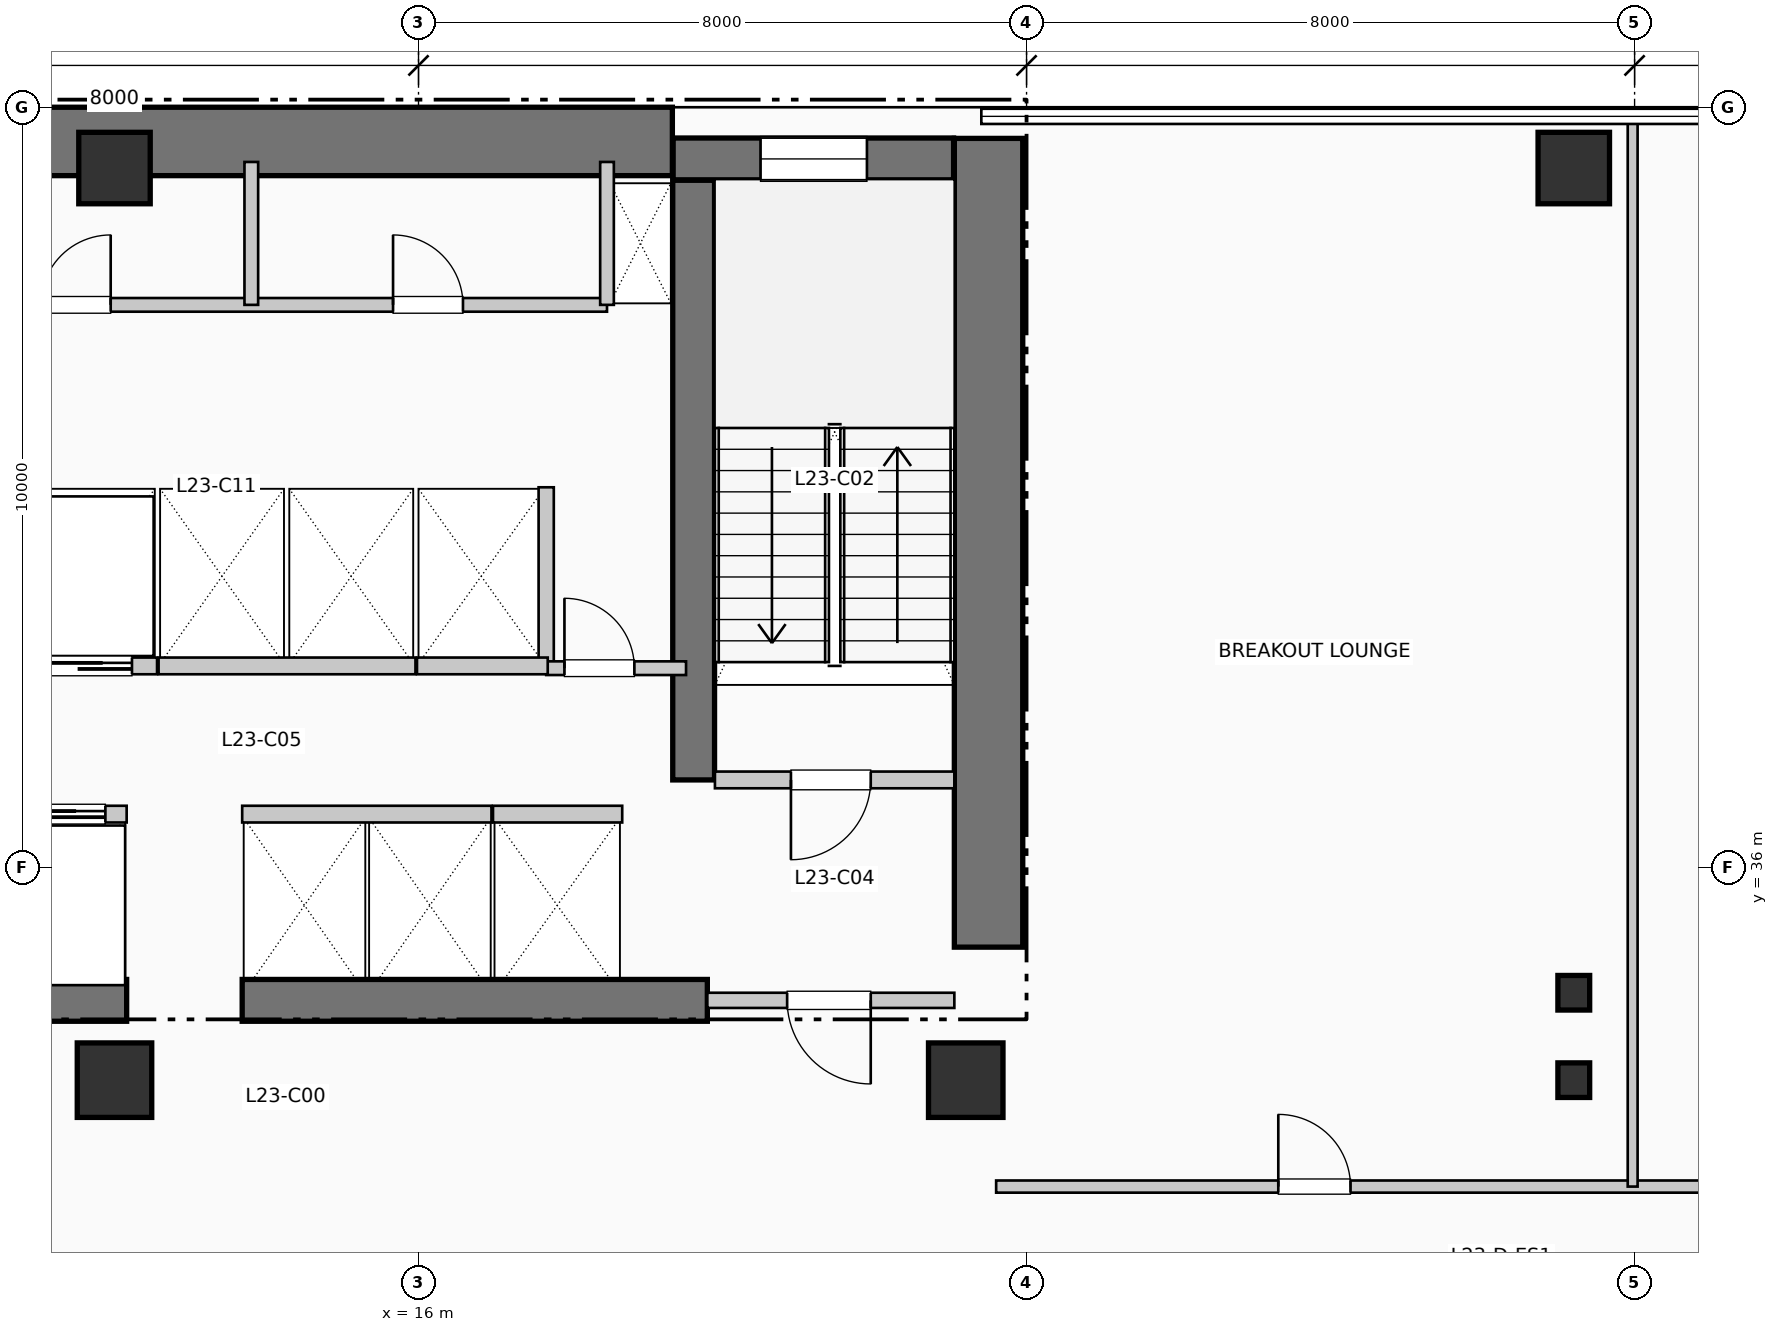
"""IFC4 building model, lengths in metres.
Left out: names, types, materials, properties, quantities, classifications, styles, units other than length and angle.
Written with IfcOpenShell. Run it as: python <this file> out.ifc"""

import sys

from ifc_helpers import new_model, si_unit, direction, frame, frame_2d, origin, origin_2d, place, context, subcontext, project, spatial, rectangle, i_section, extrude, element, fill, save


model = new_model("IFC4")
c1 = context("Model", 3, precision=1e-05, world=origin(), true_north=direction((0.0, 1.0)))
c2 = subcontext(c1, "Body", "Model", "MODEL_VIEW")
j1 = project(units=[si_unit("LENGTHUNIT", "METRE"), si_unit("PLANEANGLEUNIT", "RADIAN")], contexts=[c1])
p1 = place(None, origin())
s1 = spatial("IfcSite", under=j1, at=p1, CompositionType="ELEMENT")
p2 = place(p1, origin())
s2 = spatial("IfcBuilding", under=s1, at=p2, CompositionType="ELEMENT")
p3 = place(p2, frame((0.0, 0.0, 98.67)))
s3 = spatial("IfcBuildingStorey", under=s2, at=p3, CompositionType="ELEMENT", Elevation=98.67)
p4 = place(p3, frame((5.36, 45.55, 0.0), z_axis=(0.0, 0.0, 1.0), x_axis=(1.0, 0.0, 0.0)))
e1 = element("IfcWall", 1, at=p4, inside=s3, PredefinedType="SHEAR", context=c2, shape_type="SweptSolid", body=[
    extrude(rectangle(XDim=13.98, YDim=0.9, at=frame_2d((6.99, 0.0))), origin(), (0.0, 0.0, 1.0), 3.96),
])
p5 = place(p3, frame((23.5, 34.95, 0.0), z_axis=(0.0, 0.0, 1.0), x_axis=(0.0, 1.0, 0.0)))
e2 = element("IfcWall", 2, at=p5, inside=s3, PredefinedType="SHEAR", context=c2, shape_type="SweptSolid", body=[
    extrude(rectangle(XDim=10.64, YDim=0.9, at=frame_2d((5.32, 0.0))), origin(), (0.0, 0.0, 1.0), 3.96),
])
p6 = place(p3, frame((1.45, 34.25, 0.0), z_axis=(0.0, 0.0, 1.0), x_axis=(1.0, 0.0, 0.0)))
e3 = element("IfcWall", 3, at=p6, inside=s3, PredefinedType="SHEAR", context=c2, shape_type="SweptSolid", body=[
    extrude(rectangle(XDim=10.71, YDim=0.55, at=frame_2d((5.355, 0.0))), origin(), (0.0, 0.0, 1.0), 3.96),
])
p7 = place(p6, frame((7.25, 0.0, 0.0), z_axis=(0.0, 0.0, 1.0), x_axis=(-1.0, 0.0, 0.0)))
e4 = element("IfcOpeningElement", 4, at=p7, cuts=e3, PredefinedType="OPENING", context=c2, shape_type="SweptSolid", body=[
    extrude(rectangle(XDim=1.1, YDim=2.15, at=frame_2d((0.55, 1.075))), frame((0.0, 0.285, 0.0), z_axis=(0.0, -1.0, 0.0), x_axis=(1.0, 0.0, 0.0)), (0.0, 0.0, 1.0), 0.57),
])
p8 = place(p3, frame((13.68, 34.25, 0.0), z_axis=(0.0, 0.0, 1.0), x_axis=(1.0, 0.0, 0.0)))
e5 = element("IfcWall", 5, at=p8, inside=s3, PredefinedType="SHEAR", context=c2, shape_type="SweptSolid", body=[
    extrude(rectangle(XDim=6.12, YDim=0.55, at=frame_2d((3.06, 0.0))), origin(), (0.0, 0.0, 1.0), 3.96),
])
p9 = place(p3, frame((19.62, 37.15, 0.0), z_axis=(0.0, 0.0, 1.0), x_axis=(0.0, 1.0, 0.0)))
e6 = element("IfcWall", 6, at=p9, inside=s3, PredefinedType="SHEAR", context=c2, shape_type="SweptSolid", body=[
    extrude(rectangle(XDim=7.89, YDim=0.55, at=frame_2d((3.945, 0.0))), origin(), (0.0, 0.0, 1.0), 3.96),
])
p10 = place(p3, frame((19.35, 45.32, 0.0), z_axis=(0.0, 0.0, 1.0), x_axis=(1.0, 0.0, 0.0)))
e7 = element("IfcWall", 7, at=p10, inside=s3, PredefinedType="SHEAR", context=c2, shape_type="SweptSolid", body=[
    extrude(rectangle(XDim=3.69, YDim=0.55, at=frame_2d((1.845, 0.0))), origin(), (0.0, 0.0, 1.0), 3.96),
])
p11 = place(p10, frame((1.15, 0.0, 1.05)))
e8 = element("IfcOpeningElement", 8, at=p11, cuts=e7, PredefinedType="OPENING", context=c2, shape_type="SweptSolid", body=[
    extrude(rectangle(XDim=1.4, YDim=1.8, at=frame_2d((0.7, 0.9))), frame((0.0, 0.285, 0.0), z_axis=(0.0, -1.0, 0.0), x_axis=(1.0, 0.0, 0.0)), (0.0, 0.0, 1.0), 0.57),
])
p12 = place(p3, frame((12.0, 33.2, 0.0), z_axis=(0.0, 0.0, 1.0), x_axis=(1.0, 0.0, 0.0)))
e9 = element("IfcColumn", 9, at=p12, inside=s3, PredefinedType="COLUMN", context=c2, shape_type="SweptSolid", body=[
    extrude(rectangle(XDim=0.98, YDim=0.98, at=origin_2d()), origin(), (0.0, 0.0, 1.0), 3.96),
])
p13 = place(p3, frame((12.0, 45.2, 0.0), z_axis=(0.0, 0.0, 1.0), x_axis=(1.0, 0.0, 0.0)))
e10 = element("IfcColumn", 10, at=p13, inside=s3, PredefinedType="COLUMN", context=c2, shape_type="SweptSolid", body=[
    extrude(rectangle(XDim=0.94, YDim=0.94, at=origin_2d()), origin(), (0.0, 0.0, 1.0), 3.96),
])
p14 = place(p3, frame((23.2, 33.2, 0.0), z_axis=(0.0, 0.0, 1.0), x_axis=(1.0, 0.0, 0.0)))
e11 = element("IfcColumn", 11, at=p14, inside=s3, PredefinedType="COLUMN", context=c2, shape_type="SweptSolid", body=[
    extrude(rectangle(XDim=0.98, YDim=0.98, at=origin_2d()), origin(), (0.0, 0.0, 1.0), 3.96),
])
for number, where, z_axis, x_axis in (
    (12, (31.2, 33.2, 0.0), (0.0, 0.0, 1.0), (1.0, 0.0, 0.0)),
    (13, (31.2, 34.35, 0.0), (0.0, 0.0, 1.0), (1.0, 0.0, 0.0)),
):
    element("IfcColumn", number, at=place(p3, frame(where, z_axis=z_axis, x_axis=x_axis)), inside=s3, PredefinedType="COLUMN", context=c2, shape_type="SweptSolid", body=[
        extrude(i_section(OverallWidth=0.418, OverallDepth=0.455, WebThickness=0.032, FlangeThickness=0.051, at=origin_2d()), origin(), (0.0, 0.0, 1.0), 3.96),
    ])
p15 = place(p3, frame((31.2, 45.2, 0.0), z_axis=(0.0, 0.0, 1.0), x_axis=(1.0, 0.0, 0.0)))
e14 = element("IfcColumn", 14, at=p15, inside=s3, PredefinedType="COLUMN", context=c2, shape_type="SweptSolid", body=[
    extrude(rectangle(XDim=0.94, YDim=0.94, at=origin_2d()), origin(), (0.0, 0.0, 1.0), 3.96),
])
p16 = place(p3, frame((19.9, 37.15, 0.0), z_axis=(0.0, 0.0, 1.0), x_axis=(1.0, 0.0, 0.0)))
e15 = element("IfcWall", 15, at=p16, inside=s3, PredefinedType="PARTITIONING", context=c2, shape_type="SweptSolid", body=[
    extrude(rectangle(XDim=3.15, YDim=0.22, at=frame_2d((1.575, 0.0))), origin(), (0.0, 0.0, 1.0), 3.71),
])
p17 = place(p16, frame((2.05, 0.0, 0.0), z_axis=(0.0, 0.0, 1.0), x_axis=(-1.0, 0.0, 0.0)))
e16 = element("IfcOpeningElement", 16, at=p17, cuts=e15, PredefinedType="OPENING", context=c2, shape_type="SweptSolid", body=[
    extrude(rectangle(XDim=1.05, YDim=2.15, at=frame_2d((0.525, 1.075))), frame((0.0, 0.12, 0.0), z_axis=(0.0, -1.0, 0.0), x_axis=(1.0, 0.0, 0.0)), (0.0, 0.0, 1.0), 0.24),
])
p18 = place(p3, frame((19.8, 34.25, 0.0), z_axis=(0.0, 0.0, 1.0), x_axis=(1.0, 0.0, 0.0)))
e17 = element("IfcWall", 17, at=p18, inside=s3, PredefinedType="PARTITIONING", context=c2, shape_type="SweptSolid", body=[
    extrude(rectangle(XDim=3.25, YDim=0.2, at=frame_2d((1.625, 0.0))), origin(), (0.0, 0.0, 1.0), 3.71),
])
p19 = place(p18, frame((2.15, 0.0, 0.0), z_axis=(0.0, 0.0, 1.0), x_axis=(-1.0, 0.0, 0.0)))
e18 = element("IfcOpeningElement", 18, at=p19, cuts=e17, PredefinedType="OPENING", context=c2, shape_type="SweptSolid", body=[
    extrude(rectangle(XDim=1.1, YDim=2.15, at=frame_2d((0.55, 1.075))), frame((0.0, 0.11, 0.0), z_axis=(0.0, -1.0, 0.0), x_axis=(1.0, 0.0, 0.0)), (0.0, 0.0, 1.0), 0.22),
])
p20 = place(p3, frame((17.68, 38.65, 0.0), z_axis=(0.0, 0.0, 1.0), x_axis=(0.0, 1.0, 0.0)))
e19 = element("IfcWall", 19, at=p20, inside=s3, PredefinedType="PARTITIONING", context=c2, shape_type="SweptSolid", body=[
    extrude(rectangle(XDim=2.35, YDim=0.2, at=frame_2d((1.175, 0.0))), origin(), (0.0, 0.0, 1.0), 3.71),
])
p21 = place(p3, frame((17.68, 38.62, 0.0), z_axis=(0.0, 0.0, 1.0), x_axis=(1.0, 0.0, 0.0)))
e20 = element("IfcWall", 20, at=p21, inside=s3, PredefinedType="PARTITIONING", context=c2, shape_type="SweptSolid", body=[
    extrude(rectangle(XDim=1.84, YDim=0.18, at=frame_2d((0.92, 0.0))), origin(), (0.0, 0.0, 1.0), 3.71),
])
p22 = place(p21, frame((0.24, 0.0, 0.0)))
e21 = element("IfcOpeningElement", 21, at=p22, cuts=e20, PredefinedType="OPENING", context=c2, shape_type="SweptSolid", body=[
    extrude(rectangle(XDim=0.92, YDim=2.1, at=frame_2d((0.46, 1.05))), frame((0.0, 0.1, 0.0), z_axis=(0.0, -1.0, 0.0), x_axis=(1.0, 0.0, 0.0)), (0.0, 0.0, 1.0), 0.2),
])
p23 = place(p3, frame((8.9, 36.7, 0.0), z_axis=(0.0, 0.0, 1.0), x_axis=(1.0, 0.0, 0.0)))
e22 = element("IfcWall", 22, at=p23, inside=s3, PredefinedType="PARTITIONING", context=c2, shape_type="SweptSolid", body=[
    extrude(rectangle(XDim=3.26, YDim=0.22, at=frame_2d((1.63, 0.0))), origin(), (0.0, 0.0, 1.0), 3.71),
])
p24 = place(p23, frame((0.26, 0.0, 0.0)))
e23 = element("IfcOpeningElement", 23, at=p24, cuts=e22, PredefinedType="OPENING", context=c2, shape_type="SweptSolid", body=[
    extrude(rectangle(XDim=1.1, YDim=2.2, at=frame_2d((0.55, 1.1))), frame((0.0, 0.12, 0.0), z_axis=(0.0, -1.0, 0.0), x_axis=(1.0, 0.0, 0.0)), (0.0, 0.0, 1.0), 0.24),
])
p25 = place(p23, frame((1.88, 0.0, 0.0)))
e24 = element("IfcOpeningElement", 24, at=p25, cuts=e22, PredefinedType="OPENING", context=c2, shape_type="SweptSolid", body=[
    extrude(rectangle(XDim=1.1, YDim=2.2, at=frame_2d((0.55, 1.1))), frame((0.0, 0.12, 0.0), z_axis=(0.0, -1.0, 0.0), x_axis=(1.0, 0.0, 0.0)), (0.0, 0.0, 1.0), 0.24),
])
p26 = place(p3, frame((9.18, 38.65, 0.0), z_axis=(0.0, 0.0, 1.0), x_axis=(1.0, 0.0, 0.0)))
e25 = element("IfcWall", 25, at=p26, inside=s3, PredefinedType="PARTITIONING", context=c2, shape_type="SweptSolid", body=[
    extrude(rectangle(XDim=3.38, YDim=0.22, at=frame_2d((1.69, 0.0))), origin(), (0.0, 0.0, 1.0), 3.71),
])
p27 = place(p26, frame((0.3, 0.0, 0.0)))
e26 = element("IfcOpeningElement", 26, at=p27, cuts=e25, PredefinedType="OPENING", context=c2, shape_type="SweptSolid", body=[
    extrude(rectangle(XDim=1.1, YDim=2.2, at=frame_2d((0.55, 1.1))), frame((0.0, 0.12, 0.0), z_axis=(0.0, -1.0, 0.0), x_axis=(1.0, 0.0, 0.0)), (0.0, 0.0, 1.0), 0.24),
])
p28 = place(p26, frame((1.95, 0.0, 0.0)))
e27 = element("IfcOpeningElement", 27, at=p28, cuts=e25, PredefinedType="OPENING", context=c2, shape_type="SweptSolid", body=[
    extrude(rectangle(XDim=1.1, YDim=2.2, at=frame_2d((0.55, 1.1))), frame((0.0, 0.12, 0.0), z_axis=(0.0, -1.0, 0.0), x_axis=(1.0, 0.0, 0.0)), (0.0, 0.0, 1.0), 0.24),
])
p29 = place(p3, frame((13.68, 36.7, 0.0), z_axis=(0.0, 0.0, 1.0), x_axis=(1.0, 0.0, 0.0)))
e28 = element("IfcWall", 28, at=p29, inside=s3, PredefinedType="PARTITIONING", context=c2, shape_type="SweptSolid", body=[
    extrude(rectangle(XDim=3.28, YDim=0.22, at=frame_2d((1.64, 0.0))), origin(), (0.0, 0.0, 1.0), 3.71),
])
p30 = place(p3, frame((12.58, 38.65, 0.0), z_axis=(0.0, 0.0, 1.0), x_axis=(1.0, 0.0, 0.0)))
e29 = element("IfcWall", 29, at=p30, inside=s3, PredefinedType="PARTITIONING", context=c2, shape_type="SweptSolid", body=[
    extrude(rectangle(XDim=3.38, YDim=0.22, at=frame_2d((1.69, 0.0))), origin(), (0.0, 0.0, 1.0), 3.71),
])
p31 = place(p3, frame((16.98, 36.7, 0.0), z_axis=(0.0, 0.0, 1.0), x_axis=(1.0, 0.0, 0.0)))
e30 = element("IfcWall", 30, at=p31, inside=s3, PredefinedType="PARTITIONING", context=c2, shape_type="SweptSolid", body=[
    extrude(rectangle(XDim=1.7, YDim=0.22, at=frame_2d((0.85, 0.0))), origin(), (0.0, 0.0, 1.0), 3.71),
])
p32 = place(p3, frame((15.98, 38.65, 0.0), z_axis=(0.0, 0.0, 1.0), x_axis=(1.0, 0.0, 0.0)))
e31 = element("IfcWall", 31, at=p32, inside=s3, PredefinedType="PARTITIONING", context=c2, shape_type="SweptSolid", body=[
    extrude(rectangle(XDim=1.72, YDim=0.22, at=frame_2d((0.86, 0.0))), origin(), (0.0, 0.0, 1.0), 3.71),
])
p33 = place(p3, frame((9.15, 43.4, 0.0), z_axis=(0.0, 0.0, 1.0), x_axis=(1.0, 0.0, 0.0)))
e32 = element("IfcWall", 32, at=p33, inside=s3, PredefinedType="PLUMBINGWALL", context=c2, shape_type="SweptSolid", body=[
    extrude(rectangle(XDim=9.33, YDim=0.18, at=frame_2d((4.665, 0.0))), origin(), (0.0, 0.0, 1.0), 3.71),
])
p34 = place(p33, frame((1.88, 0.0, 0.0)))
e33 = element("IfcOpeningElement", 33, at=p34, cuts=e32, PredefinedType="OPENING", context=c2, shape_type="SweptSolid", body=[
    extrude(rectangle(XDim=0.92, YDim=2.1, at=frame_2d((0.46, 1.05))), frame((0.0, 0.1, 0.0), z_axis=(0.0, -1.0, 0.0), x_axis=(1.0, 0.0, 0.0)), (0.0, 0.0, 1.0), 0.2),
])
p35 = place(p33, frame((6.515, 0.0, 0.0)))
e34 = element("IfcOpeningElement", 34, at=p35, cuts=e32, PredefinedType="OPENING", context=c2, shape_type="SweptSolid", body=[
    extrude(rectangle(XDim=0.92, YDim=2.1, at=frame_2d((0.46, 1.05))), frame((0.0, 0.1, 0.0), z_axis=(0.0, -1.0, 0.0), x_axis=(1.0, 0.0, 0.0)), (0.0, 0.0, 1.0), 0.2),
])
for number, where, z_axis, x_axis in (
    (35, (18.48, 43.4, 0.0), (0.0, 0.0, 1.0), (0.0, 1.0, 0.0)),
    (36, (13.8, 43.4, 0.0), (0.0, 0.0, 1.0), (0.0, 1.0, 0.0)),
):
    element("IfcWall", number, at=place(p3, frame(where, z_axis=z_axis, x_axis=x_axis)), inside=s3, PredefinedType="PLUMBINGWALL", context=c2, shape_type="SweptSolid", body=[
        extrude(rectangle(XDim=1.88, YDim=0.18, at=frame_2d((0.94, 0.0))), origin(), (0.0, 0.0, 1.0), 3.71),
    ])
p36 = place(p3, frame((23.6, 31.8, 0.0), z_axis=(0.0, 0.0, 1.0), x_axis=(1.0, 0.0, 0.0)))
e37 = element("IfcWall", 37, at=p36, inside=s3, PredefinedType="PARTITIONING", context=c2, shape_type="SweptSolid", body=[
    extrude(rectangle(XDim=32.21, YDim=0.16, at=frame_2d((16.105, 0.0))), origin(), (0.0, 0.0, 1.0), 3.71),
])
p37 = place(p36, frame((3.712, 0.0, 0.0)))
e38 = element("IfcOpeningElement", 38, at=p37, cuts=e37, PredefinedType="OPENING", context=c2, shape_type="SweptSolid", body=[
    extrude(rectangle(XDim=0.95, YDim=2.15, at=frame_2d((0.475, 1.075))), frame((0.0, 0.09, 0.0), z_axis=(0.0, -1.0, 0.0), x_axis=(1.0, 0.0, 0.0)), (0.0, 0.0, 1.0), 0.18),
])
p38 = place(p36, frame((12.731, 0.0, 0.0)))
e39 = element("IfcOpeningElement", 39, at=p38, cuts=e37, PredefinedType="OPENING", context=c2, shape_type="SweptSolid", body=[
    extrude(rectangle(XDim=0.95, YDim=2.15, at=frame_2d((0.475, 1.075))), frame((0.0, 0.09, 0.0), z_axis=(0.0, -1.0, 0.0), x_axis=(1.0, 0.0, 0.0)), (0.0, 0.0, 1.0), 0.18),
])
p39 = place(p36, frame((21.589, 0.0, 0.0)))
e40 = element("IfcOpeningElement", 40, at=p39, cuts=e37, PredefinedType="OPENING", context=c2, shape_type="SweptSolid", body=[
    extrude(rectangle(XDim=0.95, YDim=2.15, at=frame_2d((0.475, 1.075))), frame((0.0, 0.09, 0.0), z_axis=(0.0, -1.0, 0.0), x_axis=(1.0, 0.0, 0.0)), (0.0, 0.0, 1.0), 0.18),
])
p40 = place(p36, frame((28.675, 0.0, 0.0)))
e41 = element("IfcOpeningElement", 41, at=p40, cuts=e37, PredefinedType="OPENING", context=c2, shape_type="SweptSolid", body=[
    extrude(rectangle(XDim=0.95, YDim=2.15, at=frame_2d((0.475, 1.075))), frame((0.0, 0.09, 0.0), z_axis=(0.0, -1.0, 0.0), x_axis=(1.0, 0.0, 0.0)), (0.0, 0.0, 1.0), 0.18),
])
p41 = place(p3, frame((31.975, 31.8, 0.0), z_axis=(0.0, 0.0, 1.0), x_axis=(0.0, 1.0, 0.0)))
e42 = element("IfcWall", 42, at=p41, inside=s3, PredefinedType="PARTITIONING", context=c2, shape_type="SweptSolid", body=[
    extrude(rectangle(XDim=14.01, YDim=0.13, at=frame_2d((7.005, 0.0))), origin(), (0.0, 0.0, 1.0), 3.71),
])
p42 = place(p11, origin())
e43 = element("IfcWindow", 43, at=p42, inside=s3, PartitioningType="SINGLE_PANEL", PredefinedType="WINDOW", context=c2, shape_type="SweptSolid", body=[
    extrude(rectangle(XDim=1.4, YDim=1.8, at=frame_2d((0.7, 0.9))), frame((0.0, 0.03, 0.0), z_axis=(0.0, -1.0, 0.0), x_axis=(1.0, 0.0, 0.0)), (0.0, 0.0, 1.0), 0.06),
])
fill(e8, e43)
p43 = place(p17, origin())
e44 = element("IfcDoor", 44, at=p43, inside=s3, OperationType="SINGLE_SWING_LEFT", PredefinedType="DOOR", context=c2, shape_type="SweptSolid", body=[
    extrude(rectangle(XDim=1.05, YDim=2.15, at=frame_2d((0.525, 1.075))), frame((0.0, 0.025, 0.0), z_axis=(0.0, -1.0, 0.0), x_axis=(1.0, 0.0, 0.0)), (0.0, 0.0, 1.0), 0.05),
])
fill(e16, e44)
p44 = place(p19, origin())
e45 = element("IfcDoor", 45, at=p44, inside=s3, OperationType="SINGLE_SWING_RIGHT", PredefinedType="DOOR", context=c2, shape_type="SweptSolid", body=[
    extrude(rectangle(XDim=1.1, YDim=2.15, at=frame_2d((0.55, 1.075))), frame((0.0, 0.025, 0.0), z_axis=(0.0, -1.0, 0.0), x_axis=(1.0, 0.0, 0.0)), (0.0, 0.0, 1.0), 0.05),
])
fill(e18, e45)
p45 = place(p22, origin())
e46 = element("IfcDoor", 46, at=p45, inside=s3, OperationType="SINGLE_SWING_LEFT", PredefinedType="DOOR", context=c2, shape_type="SweptSolid", body=[
    extrude(rectangle(XDim=0.92, YDim=2.1, at=frame_2d((0.46, 1.05))), frame((0.0, 0.025, 0.0), z_axis=(0.0, -1.0, 0.0), x_axis=(1.0, 0.0, 0.0)), (0.0, 0.0, 1.0), 0.05),
])
fill(e21, e46)
p46 = place(p25, origin())
e47 = element("IfcDoor", 47, at=p46, inside=s3, OperationType="SLIDING_TO_LEFT", PredefinedType="DOOR", context=c2, shape_type="SweptSolid", body=[
    extrude(rectangle(XDim=1.1, YDim=2.2, at=frame_2d((0.55, 1.1))), frame((0.0, 0.025, 0.0), z_axis=(0.0, -1.0, 0.0), x_axis=(1.0, 0.0, 0.0)), (0.0, 0.0, 1.0), 0.05),
])
fill(e24, e47)
p47 = place(p28, origin())
e48 = element("IfcDoor", 48, at=p47, inside=s3, OperationType="SLIDING_TO_LEFT", PredefinedType="DOOR", context=c2, shape_type="SweptSolid", body=[
    extrude(rectangle(XDim=1.1, YDim=2.2, at=frame_2d((0.55, 1.1))), frame((0.0, 0.025, 0.0), z_axis=(0.0, -1.0, 0.0), x_axis=(1.0, 0.0, 0.0)), (0.0, 0.0, 1.0), 0.05),
])
fill(e27, e48)
p48 = place(p34, origin())
e49 = element("IfcDoor", 49, at=p48, inside=s3, OperationType="SINGLE_SWING_RIGHT", PredefinedType="DOOR", context=c2, shape_type="SweptSolid", body=[
    extrude(rectangle(XDim=0.92, YDim=2.1, at=frame_2d((0.46, 1.05))), frame((0.0, 0.025, 0.0), z_axis=(0.0, -1.0, 0.0), x_axis=(1.0, 0.0, 0.0)), (0.0, 0.0, 1.0), 0.05),
])
fill(e33, e49)
p49 = place(p35, origin())
e50 = element("IfcDoor", 50, at=p49, inside=s3, OperationType="SINGLE_SWING_LEFT", PredefinedType="DOOR", context=c2, shape_type="SweptSolid", body=[
    extrude(rectangle(XDim=0.92, YDim=2.1, at=frame_2d((0.46, 1.05))), frame((0.0, 0.025, 0.0), z_axis=(0.0, -1.0, 0.0), x_axis=(1.0, 0.0, 0.0)), (0.0, 0.0, 1.0), 0.05),
])
fill(e34, e50)
p50 = place(p37, origin())
e51 = element("IfcDoor", 51, at=p50, inside=s3, OperationType="SINGLE_SWING_LEFT", PredefinedType="DOOR", context=c2, shape_type="SweptSolid", body=[
    extrude(rectangle(XDim=0.95, YDim=2.15, at=frame_2d((0.475, 1.075))), frame((0.0, 0.025, 0.0), z_axis=(0.0, -1.0, 0.0), x_axis=(1.0, 0.0, 0.0)), (0.0, 0.0, 1.0), 0.05),
])
fill(e38, e51)
save(model, sys.argv[1])
